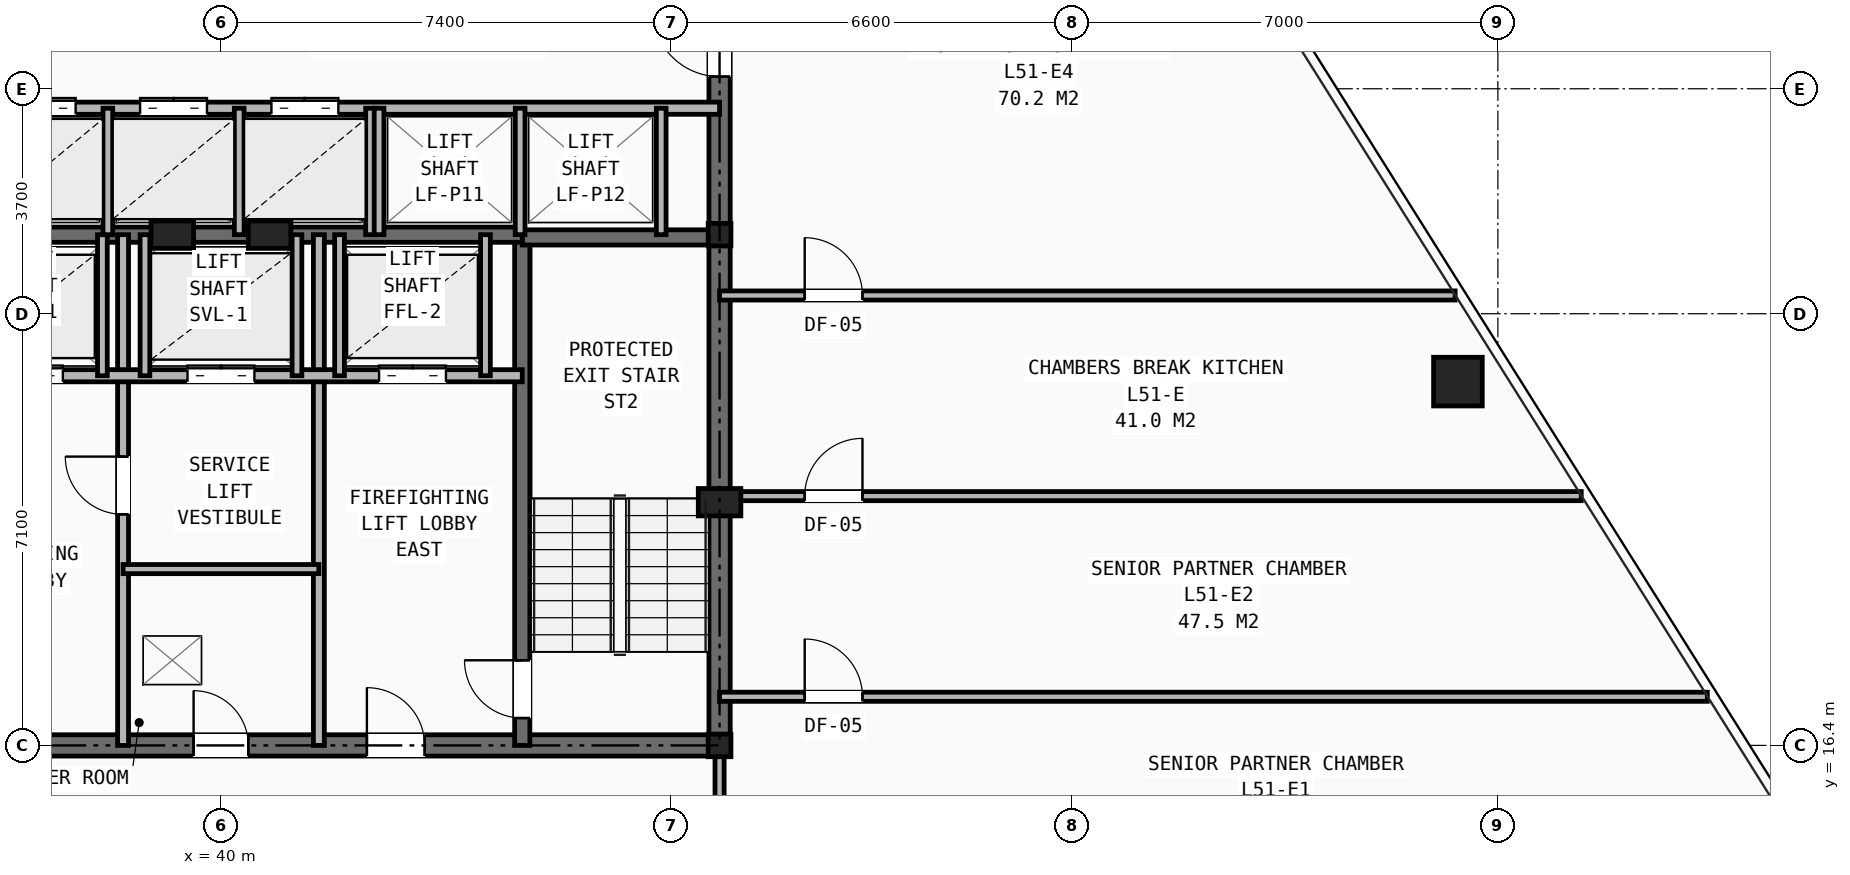
"""IFC4 building model, lengths in metres.
Left out: names, types, materials, properties, quantities, classifications, styles, units other than length and angle.
Written with IfcOpenShell. Run it as: python <this file> out.ifc"""

import sys

from ifc_helpers import new_model, si_unit, direction, frame, frame_2d, origin, origin_2d, place, context, subcontext, project, spatial, rectangle, hollow_rectangle, i_section, extrude, element, fill, save


model = new_model("IFC4")
c1 = context("Model", 3, precision=1e-05, world=origin(), true_north=direction((0.0, 1.0)))
c2 = subcontext(c1, "Body", "Model", "MODEL_VIEW")
j1 = project(units=[si_unit("LENGTHUNIT", "METRE"), si_unit("PLANEANGLEUNIT", "RADIAN")], contexts=[c1])
p1 = place(None, origin())
s1 = spatial("IfcSite", under=j1, at=p1, CompositionType="ELEMENT")
p2 = place(p1, origin())
s2 = spatial("IfcBuilding", under=s1, at=p2, CompositionType="ELEMENT")
p3 = place(p2, frame((0.0, 0.0, 179.25)))
s3 = spatial("IfcBuildingStorey", under=s2, at=p3, CompositionType="ELEMENT", Elevation=179.25)
for number, where, z_axis, x_axis in (
    (1, (48.2, 16.4, 0.0), (0.0, 0.0, 1.0), (1.0, 0.0, 0.0)),
    (2, (48.2, 24.8, 0.0), (0.0, 0.0, 1.0), (1.0, 0.0, 0.0)),
):
    element("IfcColumn", number, at=place(p3, frame(where, z_axis=z_axis, x_axis=x_axis)), inside=s3, PredefinedType="COLUMN", context=c2, shape_type="SweptSolid", body=[
        extrude(i_section(OverallWidth=0.374, OverallDepth=0.372, WebThickness=0.016, FlangeThickness=0.026, at=origin_2d()), origin(), (0.0, 0.0, 1.0), 3.45),
    ])
for number, where, z_axis, x_axis in (
    (3, (48.2, 20.4, 0.0), (0.0, 0.0, 1.0), (1.0, 0.0, 0.0)),
    (4, (39.2, 24.8, 0.0), (0.0, 0.0, 1.0), (1.0, 0.0, 0.0)),
    (5, (40.8, 24.8, 0.0), (0.0, 0.0, 1.0), (1.0, 0.0, 0.0)),
):
    element("IfcColumn", number, at=place(p3, frame(where, z_axis=z_axis, x_axis=x_axis)), inside=s3, PredefinedType="PILASTER", context=c2, shape_type="SweptSolid", body=[
        extrude(rectangle(XDim=0.7, YDim=0.45, at=origin_2d()), origin(), (0.0, 0.0, 1.0), 3.45),
    ])
p4 = place(p3, frame((60.343, 22.384, 0.0), z_axis=(0.0, 0.0, 1.0), x_axis=(1.0, 0.0, 0.0)))
e6 = element("IfcColumn", 6, at=p4, inside=s3, PredefinedType="COLUMN", context=c2, shape_type="SweptSolid", body=[
    extrude(hollow_rectangle(XDim=0.8, YDim=0.8, WallThickness=0.055, at=origin_2d()), origin(), (0.0, 0.0, 1.0), 3.45),
])
p5 = place(p3, frame((31.8, 16.4, 0.0), z_axis=(0.0, 0.0, 1.0), x_axis=(1.0, 0.0, 0.0)))
e7 = element("IfcWall", 7, at=p5, inside=s3, PredefinedType="SHEAR", context=c2, shape_type="SweptSolid", body=[
    extrude(rectangle(XDim=16.4, YDim=0.35, at=frame_2d((8.2, 0.0))), origin(), (0.0, 0.0, 1.0), 3.21),
])
p6 = place(p5, frame((7.75, 0.0, 0.0)))
e8 = element("IfcOpeningElement", 8, at=p6, cuts=e7, PredefinedType="OPENING", context=c2, shape_type="SweptSolid", body=[
    extrude(rectangle(XDim=0.9, YDim=2.1, at=frame_2d((0.45, 1.05))), frame((0.0, 0.185, 0.0), z_axis=(0.0, -1.0, 0.0), x_axis=(1.0, 0.0, 0.0)), (0.0, 0.0, 1.0), 0.37),
])
p7 = place(p5, frame((4.2, 0.0, 0.0)))
e9 = element("IfcOpeningElement", 9, at=p7, cuts=e7, PredefinedType="OPENING", context=c2, shape_type="SweptSolid", body=[
    extrude(rectangle(XDim=0.95, YDim=2.1, at=frame_2d((0.475, 1.05))), frame((0.0, 0.185, 0.0), z_axis=(0.0, -1.0, 0.0), x_axis=(1.0, 0.0, 0.0)), (0.0, 0.0, 1.0), 0.37),
])
p8 = place(p5, frame((10.6, 0.0, 0.0)))
e10 = element("IfcOpeningElement", 10, at=p8, cuts=e7, PredefinedType="OPENING", context=c2, shape_type="SweptSolid", body=[
    extrude(rectangle(XDim=0.95, YDim=2.1, at=frame_2d((0.475, 1.05))), frame((0.0, 0.185, 0.0), z_axis=(0.0, -1.0, 0.0), x_axis=(1.0, 0.0, 0.0)), (0.0, 0.0, 1.0), 0.37),
])
p9 = place(p3, frame((48.2, 16.4, 0.0), z_axis=(0.0, 0.0, 1.0), x_axis=(0.0, 1.0, 0.0)))
e11 = element("IfcWall", 11, at=p9, inside=s3, PredefinedType="SHEAR", context=c2, shape_type="SweptSolid", body=[
    extrude(rectangle(XDim=14.8, YDim=0.35, at=frame_2d((7.4, 0.0))), origin(), (0.0, 0.0, 1.0), 3.21),
])
p10 = place(p9, frame((11.0, 0.0, 0.0)))
e12 = element("IfcOpeningElement", 12, at=p10, cuts=e11, PredefinedType="OPENING", context=c2, shape_type="SweptSolid", body=[
    extrude(rectangle(XDim=1.1, YDim=2.15, at=frame_2d((0.55, 1.075))), frame((0.0, 0.185, 0.0), z_axis=(0.0, -1.0, 0.0), x_axis=(1.0, 0.0, 0.0)), (0.0, 0.0, 1.0), 0.37),
])
p11 = place(p3, frame((44.955, 16.4, 0.0), z_axis=(0.0, 0.0, 1.0), x_axis=(0.0, 1.0, 0.0)))
e13 = element("IfcWall", 13, at=p11, inside=s3, PredefinedType="SHEAR", context=c2, shape_type="SweptSolid", body=[
    extrude(rectangle(XDim=8.4, YDim=0.25, at=frame_2d((4.2, 0.0))), origin(), (0.0, 0.0, 1.0), 3.21),
])
p12 = place(p11, frame((0.45, 0.0, 0.0)))
e14 = element("IfcOpeningElement", 14, at=p12, cuts=e13, PredefinedType="OPENING", context=c2, shape_type="SweptSolid", body=[
    extrude(rectangle(XDim=0.95, YDim=2.1, at=frame_2d((0.475, 1.05))), frame((0.0, 0.135, 0.0), z_axis=(0.0, -1.0, 0.0), x_axis=(1.0, 0.0, 0.0)), (0.0, 0.0, 1.0), 0.27),
])
p13 = place(p3, frame((44.955, 24.755, 0.0), z_axis=(0.0, 0.0, 1.0), x_axis=(1.0, 0.0, 0.0)))
e15 = element("IfcWall", 15, at=p13, inside=s3, PredefinedType="SHEAR", context=c2, shape_type="SweptSolid", body=[
    extrude(rectangle(XDim=3.245, YDim=0.25, at=frame_2d((1.623, 0.0))), origin(), (0.0, 0.0, 1.0), 3.21),
])
p14 = place(p3, frame((35.045, 24.8, 0.0), z_axis=(0.0, 0.0, 1.0), x_axis=(1.0, 0.0, 0.0)))
e16 = element("IfcWall", 16, at=p14, inside=s3, PredefinedType="SHEAR", context=c2, shape_type="SweptSolid", body=[
    extrude(rectangle(XDim=9.91, YDim=0.25, at=frame_2d((4.955, 0.0))), origin(), (0.0, 0.0, 1.0), 3.21),
])
p15 = place(p3, frame((38.39, 16.4, 0.0), z_axis=(0.0, 0.0, 1.0), x_axis=(0.0, 1.0, 0.0)))
e17 = element("IfcWall", 17, at=p15, inside=s3, PredefinedType="PARTITIONING", context=c2, shape_type="SweptSolid", body=[
    extrude(rectangle(XDim=8.4, YDim=0.18, at=frame_2d((4.2, 0.0))), origin(), (0.0, 0.0, 1.0), 2.665),
])
p16 = place(p15, frame((3.8, 0.0, 0.0)))
e18 = element("IfcOpeningElement", 18, at=p16, cuts=e17, PredefinedType="OPENING", context=c2, shape_type="SweptSolid", body=[
    extrude(rectangle(XDim=0.95, YDim=2.1, at=frame_2d((0.475, 1.05))), frame((0.0, 0.1, 0.0), z_axis=(0.0, -1.0, 0.0), x_axis=(1.0, 0.0, 0.0)), (0.0, 0.0, 1.0), 0.2),
])
p17 = place(p3, frame((41.61, 16.4, 0.0), z_axis=(0.0, 0.0, 1.0), x_axis=(0.0, 1.0, 0.0)))
e19 = element("IfcWall", 19, at=p17, inside=s3, PredefinedType="PARTITIONING", context=c2, shape_type="SweptSolid", body=[
    extrude(rectangle(XDim=8.4, YDim=0.18, at=frame_2d((4.2, 0.0))), origin(), (0.0, 0.0, 1.0), 2.665),
])
p18 = place(p3, frame((35.045, 22.48, 0.0), z_axis=(0.0, 0.0, 1.0), x_axis=(1.0, 0.0, 0.0)))
e20 = element("IfcWall", 20, at=p18, inside=s3, PredefinedType="SOLIDWALL", context=c2, shape_type="SweptSolid", body=[
    extrude(rectangle(XDim=9.91, YDim=0.2, at=frame_2d((4.955, 0.0))), origin(), (0.0, 0.0, 1.0), 3.21),
])
p19 = place(p18, frame((1.255, 0.0, 0.0)))
e21 = element("IfcOpeningElement", 21, at=p19, cuts=e20, PredefinedType="OPENING", context=c2, shape_type="SweptSolid", body=[
    extrude(rectangle(XDim=1.1, YDim=2.15, at=frame_2d((0.55, 1.075))), frame((0.0, 0.11, 0.0), z_axis=(0.0, -1.0, 0.0), x_axis=(1.0, 0.0, 0.0)), (0.0, 0.0, 1.0), 0.22),
])
p20 = place(p18, frame((7.555, 0.0, 0.0)))
e22 = element("IfcOpeningElement", 22, at=p20, cuts=e20, PredefinedType="OPENING", context=c2, shape_type="SweptSolid", body=[
    extrude(rectangle(XDim=1.1, YDim=2.15, at=frame_2d((0.55, 1.075))), frame((0.0, 0.11, 0.0), z_axis=(0.0, -1.0, 0.0), x_axis=(1.0, 0.0, 0.0)), (0.0, 0.0, 1.0), 0.22),
])
p21 = place(p18, frame((4.405, 0.0, 0.0)))
e23 = element("IfcOpeningElement", 23, at=p21, cuts=e20, PredefinedType="OPENING", context=c2, shape_type="SweptSolid", body=[
    extrude(rectangle(XDim=1.1, YDim=2.15, at=frame_2d((0.55, 1.075))), frame((0.0, 0.11, 0.0), z_axis=(0.0, -1.0, 0.0), x_axis=(1.0, 0.0, 0.0)), (0.0, 0.0, 1.0), 0.22),
])
p22 = place(p3, frame((38.39, 19.3, 0.0), z_axis=(0.0, 0.0, 1.0), x_axis=(1.0, 0.0, 0.0)))
e24 = element("IfcWall", 24, at=p22, inside=s3, PredefinedType="PARTITIONING", context=c2, shape_type="SweptSolid", body=[
    extrude(rectangle(XDim=3.22, YDim=0.15, at=frame_2d((1.61, 0.0))), origin(), (0.0, 0.0, 1.0), 3.21),
])
for number, where, z_axis, x_axis in (
    (25, (38.05, 22.48, 0.0), (0.0, 0.0, 1.0), (0.0, 1.0, 0.0)),
    (26, (41.95, 22.48, 0.0), (0.0, 0.0, 1.0), (0.0, 1.0, 0.0)),
    (27, (44.35, 22.48, 0.0), (0.0, 0.0, 1.0), (0.0, 1.0, 0.0)),
    (28, (38.75, 22.48, 0.0), (0.0, 0.0, 1.0), (0.0, 1.0, 0.0)),
    (29, (41.25, 22.48, 0.0), (0.0, 0.0, 1.0), (0.0, 1.0, 0.0)),
):
    element("IfcWall", number, at=place(p3, frame(where, z_axis=z_axis, x_axis=x_axis)), inside=s3, PredefinedType="SOLIDWALL", context=c2, shape_type="SweptSolid", body=[
        extrude(rectangle(XDim=2.32, YDim=0.16, at=frame_2d((1.16, 0.0))), origin(), (0.0, 0.0, 1.0), 3.21),
    ])
p23 = place(p3, frame((33.82, 26.88, 0.0), z_axis=(0.0, 0.0, 1.0), x_axis=(1.0, 0.0, 0.0)))
e30 = element("IfcWall", 30, at=p23, inside=s3, PredefinedType="SOLIDWALL", context=c2, shape_type="SweptSolid", body=[
    extrude(rectangle(XDim=14.38, YDim=0.2, at=frame_2d((7.19, 0.0))), origin(), (0.0, 0.0, 1.0), 2.665),
])
p24 = place(p23, frame((0.53, 0.0, 0.0)))
e31 = element("IfcOpeningElement", 31, at=p24, cuts=e30, PredefinedType="OPENING", context=c2, shape_type="SweptSolid", body=[
    extrude(rectangle(XDim=1.1, YDim=2.15, at=frame_2d((0.55, 1.075))), frame((0.0, 0.11, 0.0), z_axis=(0.0, -1.0, 0.0), x_axis=(1.0, 0.0, 0.0)), (0.0, 0.0, 1.0), 0.22),
])
p25 = place(p23, frame((2.69, 0.0, 0.0)))
e32 = element("IfcOpeningElement", 32, at=p25, cuts=e30, PredefinedType="OPENING", context=c2, shape_type="SweptSolid", body=[
    extrude(rectangle(XDim=1.1, YDim=2.15, at=frame_2d((0.55, 1.075))), frame((0.0, 0.11, 0.0), z_axis=(0.0, -1.0, 0.0), x_axis=(1.0, 0.0, 0.0)), (0.0, 0.0, 1.0), 0.22),
])
p26 = place(p23, frame((4.85, 0.0, 0.0)))
e33 = element("IfcOpeningElement", 33, at=p26, cuts=e30, PredefinedType="OPENING", context=c2, shape_type="SweptSolid", body=[
    extrude(rectangle(XDim=1.1, YDim=2.15, at=frame_2d((0.55, 1.075))), frame((0.0, 0.11, 0.0), z_axis=(0.0, -1.0, 0.0), x_axis=(1.0, 0.0, 0.0)), (0.0, 0.0, 1.0), 0.22),
])
p27 = place(p23, frame((7.01, 0.0, 0.0)))
e34 = element("IfcOpeningElement", 34, at=p27, cuts=e30, PredefinedType="OPENING", context=c2, shape_type="SweptSolid", body=[
    extrude(rectangle(XDim=1.1, YDim=2.15, at=frame_2d((0.55, 1.075))), frame((0.0, 0.11, 0.0), z_axis=(0.0, -1.0, 0.0), x_axis=(1.0, 0.0, 0.0)), (0.0, 0.0, 1.0), 0.22),
])
for number, where, z_axis, x_axis in (
    (35, (38.14, 24.8, 0.0), (0.0, 0.0, 1.0), (0.0, 1.0, 0.0)),
    (36, (40.3, 24.8, 0.0), (0.0, 0.0, 1.0), (0.0, 1.0, 0.0)),
    (37, (42.46, 24.8, 0.0), (0.0, 0.0, 1.0), (0.0, 1.0, 0.0)),
    (38, (42.6, 24.8, 0.0), (0.0, 0.0, 1.0), (0.0, 1.0, 0.0)),
    (39, (44.92, 24.8, 0.0), (0.0, 0.0, 1.0), (0.0, 1.0, 0.0)),
    (40, (47.24, 24.8, 0.0), (0.0, 0.0, 1.0), (0.0, 1.0, 0.0)),
):
    element("IfcWall", number, at=place(p3, frame(where, z_axis=z_axis, x_axis=x_axis)), inside=s3, PredefinedType="SOLIDWALL", context=c2, shape_type="SweptSolid", body=[
        extrude(rectangle(XDim=2.08, YDim=0.16, at=frame_2d((1.04, 0.0))), origin(), (0.0, 0.0, 1.0), 3.21),
    ])
p28 = place(p3, frame((48.2, 14.1, 0.0), z_axis=(0.0, 0.0, 1.0), x_axis=(0.0, 1.0, 0.0)))
e41 = element("IfcWall", 41, at=p28, inside=s3, PredefinedType="PARTITIONING", context=c2, shape_type="SweptSolid", body=[
    extrude(rectangle(XDim=2.3, YDim=0.15, at=frame_2d((1.15, 0.0))), origin(), (0.0, 0.0, 1.0), 2.665),
])
p29 = place(p3, frame((48.2, 17.2, 0.0), z_axis=(0.0, 0.0, 1.0), x_axis=(1.0, 0.0, 0.0)))
e42 = element("IfcWall", 42, at=p29, inside=s3, PredefinedType="PARTITIONING", context=c2, shape_type="SweptSolid", body=[
    extrude(rectangle(XDim=16.244, YDim=0.15, at=frame_2d((8.122, 0.0))), origin(), (0.0, 0.0, 1.0), 2.589),
])
p30 = place(p29, frame((1.4, 0.0, 0.0)))
e43 = element("IfcOpeningElement", 43, at=p30, cuts=e42, PredefinedType="OPENING", context=c2, shape_type="SweptSolid", body=[
    extrude(rectangle(XDim=0.95, YDim=2.1, at=frame_2d((0.475, 1.05))), frame((0.0, 0.085, 0.0), z_axis=(0.0, -1.0, 0.0), x_axis=(1.0, 0.0, 0.0)), (0.0, 0.0, 1.0), 0.17),
])
p31 = place(p3, frame((48.2, 20.5, 0.0), z_axis=(0.0, 0.0, 1.0), x_axis=(1.0, 0.0, 0.0)))
e44 = element("IfcWall", 44, at=p31, inside=s3, PredefinedType="PARTITIONING", context=c2, shape_type="SweptSolid", body=[
    extrude(rectangle(XDim=14.171, YDim=0.15, at=frame_2d((7.085, 0.0))), origin(), (0.0, 0.0, 1.0), 2.589),
])
p32 = place(p31, frame((1.4, 0.0, 0.0)))
e45 = element("IfcOpeningElement", 45, at=p32, cuts=e44, PredefinedType="OPENING", context=c2, shape_type="SweptSolid", body=[
    extrude(rectangle(XDim=0.95, YDim=2.1, at=frame_2d((0.475, 1.05))), frame((0.0, 0.085, 0.0), z_axis=(0.0, -1.0, 0.0), x_axis=(1.0, 0.0, 0.0)), (0.0, 0.0, 1.0), 0.17),
])
p33 = place(p3, frame((48.2, 23.8, 0.0), z_axis=(0.0, 0.0, 1.0), x_axis=(1.0, 0.0, 0.0)))
e46 = element("IfcWall", 46, at=p33, inside=s3, PredefinedType="PARTITIONING", context=c2, shape_type="SweptSolid", body=[
    extrude(rectangle(XDim=12.097, YDim=0.15, at=frame_2d((6.049, 0.0))), origin(), (0.0, 0.0, 1.0), 2.589),
])
p34 = place(p33, frame((1.4, 0.0, 0.0)))
e47 = element("IfcOpeningElement", 47, at=p34, cuts=e46, PredefinedType="OPENING", context=c2, shape_type="SweptSolid", body=[
    extrude(rectangle(XDim=0.95, YDim=2.1, at=frame_2d((0.475, 1.05))), frame((0.0, 0.085, 0.0), z_axis=(0.0, -1.0, 0.0), x_axis=(1.0, 0.0, 0.0)), (0.0, 0.0, 1.0), 0.17),
])
p35 = place(p6, origin())
e48 = element("IfcDoor", 48, at=p35, inside=s3, OperationType="SINGLE_SWING_LEFT", PredefinedType="DOOR", context=c2, shape_type="SweptSolid", body=[
    extrude(rectangle(XDim=0.9, YDim=2.1, at=frame_2d((0.45, 1.05))), frame((0.0, 0.025, 0.0), z_axis=(0.0, -1.0, 0.0), x_axis=(1.0, 0.0, 0.0)), (0.0, 0.0, 1.0), 0.05),
])
fill(e8, e48)
p36 = place(p16, origin())
e49 = element("IfcDoor", 49, at=p36, inside=s3, OperationType="SINGLE_SWING_RIGHT", PredefinedType="DOOR", context=c2, shape_type="SweptSolid", body=[
    extrude(rectangle(XDim=0.95, YDim=2.1, at=frame_2d((0.475, 1.05))), frame((0.0, 0.025, 0.0), z_axis=(0.0, -1.0, 0.0), x_axis=(1.0, 0.0, 0.0)), (0.0, 0.0, 1.0), 0.05),
])
fill(e18, e49)
p37 = place(p12, origin())
e50 = element("IfcDoor", 50, at=p37, inside=s3, OperationType="SINGLE_SWING_RIGHT", PredefinedType="DOOR", context=c2, shape_type="SweptSolid", body=[
    extrude(rectangle(XDim=0.95, YDim=2.1, at=frame_2d((0.475, 1.05))), frame((0.0, 0.025, 0.0), z_axis=(0.0, -1.0, 0.0), x_axis=(1.0, 0.0, 0.0)), (0.0, 0.0, 1.0), 0.05),
])
fill(e14, e50)
p38 = place(p8, origin())
e51 = element("IfcDoor", 51, at=p38, inside=s3, OperationType="SINGLE_SWING_LEFT", PredefinedType="DOOR", context=c2, shape_type="SweptSolid", body=[
    extrude(rectangle(XDim=0.95, YDim=2.1, at=frame_2d((0.475, 1.05))), frame((0.0, 0.025, 0.0), z_axis=(0.0, -1.0, 0.0), x_axis=(1.0, 0.0, 0.0)), (0.0, 0.0, 1.0), 0.05),
])
fill(e10, e51)
p39 = place(p19, origin())
e52 = element("IfcDoor", 52, at=p39, inside=s3, OperationType="DOUBLE_DOOR_SLIDING", PredefinedType="DOOR", context=c2, shape_type="SweptSolid", body=[
    extrude(rectangle(XDim=1.1, YDim=2.15, at=frame_2d((0.55, 1.075))), frame((0.0, 0.025, 0.0), z_axis=(0.0, -1.0, 0.0), x_axis=(1.0, 0.0, 0.0)), (0.0, 0.0, 1.0), 0.05),
])
fill(e21, e52)
p40 = place(p20, origin())
e53 = element("IfcDoor", 53, at=p40, inside=s3, OperationType="DOUBLE_DOOR_SLIDING", PredefinedType="DOOR", context=c2, shape_type="SweptSolid", body=[
    extrude(rectangle(XDim=1.1, YDim=2.15, at=frame_2d((0.55, 1.075))), frame((0.0, 0.025, 0.0), z_axis=(0.0, -1.0, 0.0), x_axis=(1.0, 0.0, 0.0)), (0.0, 0.0, 1.0), 0.05),
])
fill(e22, e53)
p41 = place(p21, origin())
e54 = element("IfcDoor", 54, at=p41, inside=s3, OperationType="DOUBLE_DOOR_SLIDING", PredefinedType="DOOR", context=c2, shape_type="SweptSolid", body=[
    extrude(rectangle(XDim=1.1, YDim=2.15, at=frame_2d((0.55, 1.075))), frame((0.0, 0.025, 0.0), z_axis=(0.0, -1.0, 0.0), x_axis=(1.0, 0.0, 0.0)), (0.0, 0.0, 1.0), 0.05),
])
fill(e23, e54)
p42 = place(p10, origin())
e55 = element("IfcDoor", 55, at=p42, inside=s3, OperationType="SINGLE_SWING_RIGHT", PredefinedType="DOOR", context=c2, shape_type="SweptSolid", body=[
    extrude(rectangle(XDim=1.1, YDim=2.15, at=frame_2d((0.55, 1.075))), frame((0.0, 0.025, 0.0), z_axis=(0.0, -1.0, 0.0), x_axis=(1.0, 0.0, 0.0)), (0.0, 0.0, 1.0), 0.05),
])
fill(e12, e55)
p43 = place(p25, origin())
e56 = element("IfcDoor", 56, at=p43, inside=s3, OperationType="DOUBLE_DOOR_SLIDING", PredefinedType="DOOR", context=c2, shape_type="SweptSolid", body=[
    extrude(rectangle(XDim=1.1, YDim=2.15, at=frame_2d((0.55, 1.075))), frame((0.0, 0.025, 0.0), z_axis=(0.0, -1.0, 0.0), x_axis=(1.0, 0.0, 0.0)), (0.0, 0.0, 1.0), 0.05),
])
fill(e32, e56)
p44 = place(p26, origin())
e57 = element("IfcDoor", 57, at=p44, inside=s3, OperationType="DOUBLE_DOOR_SLIDING", PredefinedType="DOOR", context=c2, shape_type="SweptSolid", body=[
    extrude(rectangle(XDim=1.1, YDim=2.15, at=frame_2d((0.55, 1.075))), frame((0.0, 0.025, 0.0), z_axis=(0.0, -1.0, 0.0), x_axis=(1.0, 0.0, 0.0)), (0.0, 0.0, 1.0), 0.05),
])
fill(e33, e57)
p45 = place(p27, origin())
e58 = element("IfcDoor", 58, at=p45, inside=s3, OperationType="DOUBLE_DOOR_SLIDING", PredefinedType="DOOR", context=c2, shape_type="SweptSolid", body=[
    extrude(rectangle(XDim=1.1, YDim=2.15, at=frame_2d((0.55, 1.075))), frame((0.0, 0.025, 0.0), z_axis=(0.0, -1.0, 0.0), x_axis=(1.0, 0.0, 0.0)), (0.0, 0.0, 1.0), 0.05),
])
fill(e34, e58)
p46 = place(p30, origin())
e59 = element("IfcDoor", 59, at=p46, inside=s3, OperationType="SINGLE_SWING_LEFT", PredefinedType="DOOR", context=c2, shape_type="SweptSolid", body=[
    extrude(rectangle(XDim=0.95, YDim=2.1, at=frame_2d((0.475, 1.05))), frame((0.0, 0.025, 0.0), z_axis=(0.0, -1.0, 0.0), x_axis=(1.0, 0.0, 0.0)), (0.0, 0.0, 1.0), 0.05),
])
fill(e43, e59)
p47 = place(p32, origin())
e60 = element("IfcDoor", 60, at=p47, inside=s3, OperationType="SINGLE_SWING_RIGHT", PredefinedType="DOOR", context=c2, shape_type="SweptSolid", body=[
    extrude(rectangle(XDim=0.95, YDim=2.1, at=frame_2d((0.475, 1.05))), frame((0.0, 0.025, 0.0), z_axis=(0.0, -1.0, 0.0), x_axis=(1.0, 0.0, 0.0)), (0.0, 0.0, 1.0), 0.05),
])
fill(e45, e60)
p48 = place(p34, origin())
e61 = element("IfcDoor", 61, at=p48, inside=s3, OperationType="SINGLE_SWING_LEFT", PredefinedType="DOOR", context=c2, shape_type="SweptSolid", body=[
    extrude(rectangle(XDim=0.95, YDim=2.1, at=frame_2d((0.475, 1.05))), frame((0.0, 0.025, 0.0), z_axis=(0.0, -1.0, 0.0), x_axis=(1.0, 0.0, 0.0)), (0.0, 0.0, 1.0), 0.05),
])
fill(e47, e61)
save(model, sys.argv[1])
